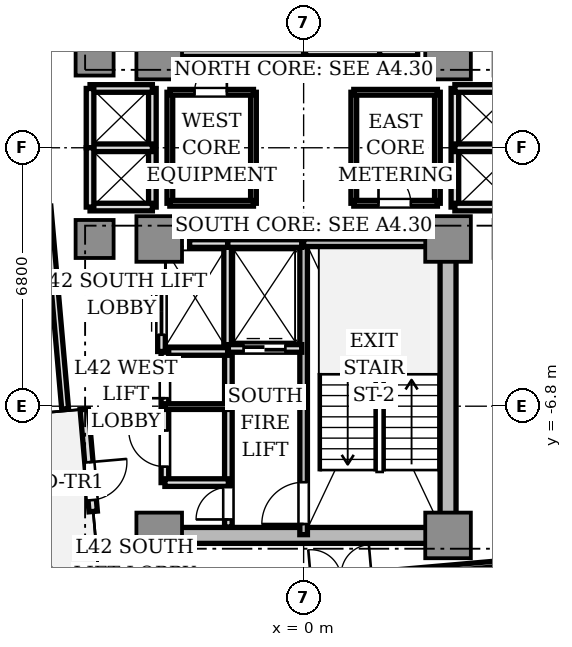
"""IFC4 building model, lengths in metres.
Left out: names, types, materials, properties, quantities, classifications, styles, units other than length and angle.
Written with IfcOpenShell. Run it as: python <this file> out.ifc"""

import sys

from ifc_helpers import new_model, si_unit, direction, frame, frame_2d, origin, origin_2d, place, context, subcontext, project, spatial, rectangle, extrude, source, transform, mapped, element, fill, save


model = new_model("IFC4")
c1 = context("Model", 3, precision=1e-05, world=origin(), true_north=direction((0.0, 1.0)))
c2 = subcontext(c1, "Body", "Model", "MODEL_VIEW")
j1 = project(units=[si_unit("LENGTHUNIT", "METRE"), si_unit("PLANEANGLEUNIT", "RADIAN")], contexts=[c1])
p1 = place(None, origin())
s1 = spatial("IfcSite", under=j1, at=p1, CompositionType="ELEMENT")
p2 = place(p1, origin())
s2 = spatial("IfcBuilding", under=s1, at=p2, CompositionType="ELEMENT")
p3 = place(p2, frame((0.0, 0.0, 153.95)))
s3 = spatial("IfcBuildingStorey", under=s2, at=p3, CompositionType="ELEMENT", Elevation=153.95)
p4 = place(p3, frame((-3.55, -10.2, 0.0), z_axis=(0.0, 0.0, 1.0), x_axis=(1.0, 0.0, 0.0)))
e1 = element("IfcWall", 1, at=p4, inside=s3, PredefinedType="SHEAR", context=c2, shape_type="SweptSolid", body=[
    extrude(rectangle(XDim=7.1, YDim=0.42, at=frame_2d((3.55, 0.0))), origin(), (0.0, 0.0, 1.0), 3.11),
])
p5 = place(p3, frame((3.8, -9.75, 0.0), z_axis=(0.0, 0.0, 1.0), x_axis=(0.0, 1.0, 0.0)))
e2 = element("IfcWall", 2, at=p5, inside=s3, PredefinedType="SHEAR", context=c2, shape_type="SweptSolid", body=[
    extrude(rectangle(XDim=6.9, YDim=0.42, at=frame_2d((3.45, 0.0))), origin(), (0.0, 0.0, 1.0), 3.11),
])
m1 = source(origin(), c2, "Body", "SweptSolid", [
    extrude(rectangle(XDim=1.2, YDim=1.2, at=origin_2d()), origin(), (0.0, 0.0, 1.0), 3.11),
])
for number, where, z_axis, x_axis in (
    (3, (-3.8, 2.4, 0.0), (0.0, 0.0, 1.0), (1.0, 0.0, 0.0)),
    (4, (3.8, 2.4, 0.0), (0.0, 0.0, 1.0), (1.0, 0.0, 0.0)),
    (5, (-3.8, -2.4, 0.0), (0.0, 0.0, 1.0), (1.0, 0.0, 0.0)),
    (6, (3.8, -2.4, 0.0), (0.0, 0.0, 1.0), (1.0, 0.0, 0.0)),
    (7, (-3.8, -10.2, 0.0), (0.0, 0.0, 1.0), (1.0, 0.0, 0.0)),
    (8, (3.8, -10.2, 0.0), (0.0, 0.0, 1.0), (1.0, 0.0, 0.0)),
):
    element("IfcColumn", number, at=place(p3, frame(where, z_axis=z_axis, x_axis=x_axis)), inside=s3, PredefinedType="COLUMN", context=c2, shape_type="MappedRepresentation", body=[
        mapped(m1, transform((0.0, 0.0, 0.0), scale=1.0)),
    ])
m2 = source(origin(), c2, "Body", "SweptSolid", [
    extrude(rectangle(XDim=1.0, YDim=1.0, at=origin_2d()), origin(), (0.0, 0.0, 1.0), 3.11),
])
for number, where, z_axis, x_axis in (
    (9, (-5.5, 2.4, 0.0), (0.0, 0.0, 1.0), (1.0, 0.0, 0.0)),
    (10, (-5.5, -2.4, 0.0), (0.0, 0.0, 1.0), (1.0, 0.0, 0.0)),
):
    element("IfcColumn", number, at=place(p3, frame(where, z_axis=z_axis, x_axis=x_axis)), inside=s3, PredefinedType="COLUMN", context=c2, shape_type="MappedRepresentation", body=[
        mapped(m2, transform((0.0, 0.0, 0.0), scale=1.0)),
    ])
p6 = place(p3, frame((-5.772, -6.879, 0.0), z_axis=(0.0, 0.0, 1.0), x_axis=(0.087168071984, -0.996193619346, 0.0)))
e11 = element("IfcWall", 11, at=p6, inside=s3, PredefinedType="STANDARD", context=c2, shape_type="SweptSolid", body=[
    extrude(rectangle(XDim=2.7, YDim=0.22, at=frame_2d((1.35, 0.0))), origin(), (0.0, 0.0, 1.0), 3.11),
])
p7 = place(p6, frame((1.4, 0.0, 0.0)))
e12 = element("IfcOpeningElement", 12, at=p7, cuts=e11, PredefinedType="OPENING", context=c2, shape_type="SweptSolid", body=[
    extrude(rectangle(XDim=1.0, YDim=2.2, at=frame_2d((0.5, 1.1))), frame((0.0, 0.12, 0.0), z_axis=(0.0, -1.0, 0.0), x_axis=(1.0, 0.0, 0.0)), (0.0, 0.0, 1.0), 0.24),
])
p8 = place(p3, frame((0.0, 2.5, 0.0), z_axis=(0.0, 0.0, 1.0), x_axis=(0.0, 1.0, 0.0)))
e13 = element("IfcWall", 13, at=p8, inside=s3, PredefinedType="SOLIDWALL", context=c2, shape_type="SweptSolid", body=[
    extrude(rectangle(XDim=7.68, YDim=0.2, at=frame_2d((3.84, 0.0))), origin(), (0.0, 0.0, 1.0), 3.11),
])
p9 = place(p8, frame((6.36, 0.0, 0.0)))
e14 = element("IfcOpeningElement", 14, at=p9, cuts=e13, PredefinedType="OPENING", context=c2, shape_type="SweptSolid", body=[
    extrude(rectangle(XDim=1.1, YDim=2.15, at=frame_2d((0.55, 1.075))), frame((0.0, 0.11, 0.0), z_axis=(0.0, -1.0, 0.0), x_axis=(1.0, 0.0, 0.0)), (0.0, 0.0, 1.0), 0.22),
])
p10 = place(p3, frame((-3.72, 2.5, 0.0), z_axis=(0.0, 0.0, 1.0), x_axis=(1.0, 0.0, 0.0)))
e15 = element("IfcWall", 15, at=p10, inside=s3, PredefinedType="SOLIDWALL", context=c2, shape_type="SweptSolid", body=[
    extrude(rectangle(XDim=3.72, YDim=0.2, at=frame_2d((1.86, 0.0))), origin(), (0.0, 0.0, 1.0), 3.11),
])
p11 = place(p3, frame((0.0, -10.18, 0.0), z_axis=(0.0, 0.0, 1.0), x_axis=(0.0, 1.0, 0.0)))
e16 = element("IfcWall", 16, at=p11, inside=s3, PredefinedType="SOLIDWALL", context=c2, shape_type="SweptSolid", body=[
    extrude(rectangle(XDim=7.68, YDim=0.2, at=frame_2d((3.84, 0.0))), origin(), (0.0, 0.0, 1.0), 3.11),
])
p12 = place(p11, frame((0.28, 0.0, 0.0)))
e17 = element("IfcOpeningElement", 17, at=p12, cuts=e16, PredefinedType="OPENING", context=c2, shape_type="SweptSolid", body=[
    extrude(rectangle(XDim=1.1, YDim=2.15, at=frame_2d((0.55, 1.075))), frame((0.0, 0.11, 0.0), z_axis=(0.0, -1.0, 0.0), x_axis=(1.0, 0.0, 0.0)), (0.0, 0.0, 1.0), 0.22),
])
p13 = place(p3, frame((0.0, -2.5, 0.0), z_axis=(0.0, 0.0, 1.0), x_axis=(1.0, 0.0, 0.0)))
e18 = element("IfcWall", 18, at=p13, inside=s3, PredefinedType="SOLIDWALL", context=c2, shape_type="SweptSolid", body=[
    extrude(rectangle(XDim=3.72, YDim=0.2, at=frame_2d((1.86, 0.0))), origin(), (0.0, 0.0, 1.0), 3.11),
])
p14 = place(p3, frame((-1.98, -9.98, 0.0), z_axis=(0.0, 0.0, 1.0), x_axis=(0.0, 1.0, 0.0)))
e19 = element("IfcWall", 19, at=p14, inside=s3, PredefinedType="SOLIDWALL", context=c2, shape_type="SweptSolid", body=[
    extrude(rectangle(XDim=4.66, YDim=0.2, at=frame_2d((2.33, 0.0))), origin(), (0.0, 0.0, 1.0), 2.66),
])
p15 = place(p14, frame((0.2, 0.0, 0.0)))
e20 = element("IfcOpeningElement", 20, at=p15, cuts=e19, PredefinedType="OPENING", context=c2, shape_type="SweptSolid", body=[
    extrude(rectangle(XDim=0.85, YDim=2.1, at=frame_2d((0.425, 1.05))), frame((0.0, 0.11, 0.0), z_axis=(0.0, -1.0, 0.0), x_axis=(1.0, 0.0, 0.0)), (0.0, 0.0, 1.0), 0.22),
])
p16 = place(p3, frame((2.0, 2.5, 0.0), z_axis=(0.0, 0.0, 1.0), x_axis=(0.0, 1.0, 0.0)))
e21 = element("IfcWall", 21, at=p16, inside=s3, PredefinedType="SOLIDWALL", context=c2, shape_type="SweptSolid", body=[
    extrude(rectangle(XDim=2.78, YDim=0.2, at=frame_2d((1.39, 0.0))), origin(), (0.0, 0.0, 1.0), 2.66),
])
p17 = place(p3, frame((0.05, 2.52, 0.0), z_axis=(0.0, 0.0, 1.0), x_axis=(1.0, 0.0, 0.0)))
e22 = element("IfcWall", 22, at=p17, inside=s3, PredefinedType="SOLIDWALL", context=c2, shape_type="SweptSolid", body=[
    extrude(rectangle(XDim=1.95, YDim=0.2, at=frame_2d((0.975, 0.0))), origin(), (0.0, 0.0, 1.0), 2.66),
])
p18 = place(p3, frame((-2.0, -5.28, 0.0), z_axis=(0.0, 0.0, 1.0), x_axis=(0.0, 1.0, 0.0)))
e23 = element("IfcWall", 23, at=p18, inside=s3, PredefinedType="SOLIDWALL", context=c2, shape_type="SweptSolid", body=[
    extrude(rectangle(XDim=2.78, YDim=0.2, at=frame_2d((1.39, 0.0))), origin(), (0.0, 0.0, 1.0), 2.66),
])
p19 = place(p3, frame((-2.0, -2.52, 0.0), z_axis=(0.0, 0.0, 1.0), x_axis=(1.0, 0.0, 0.0)))
e24 = element("IfcWall", 24, at=p19, inside=s3, PredefinedType="SOLIDWALL", context=c2, shape_type="SweptSolid", body=[
    extrude(rectangle(XDim=1.95, YDim=0.2, at=frame_2d((0.975, 0.0))), origin(), (0.0, 0.0, 1.0), 2.66),
])
p20 = place(p3, frame((-1.98, -5.28, 0.0), z_axis=(0.0, 0.0, 1.0), x_axis=(1.0, 0.0, 0.0)))
e25 = element("IfcWall", 25, at=p20, inside=s3, PredefinedType="SOLIDWALL", context=c2, shape_type="SweptSolid", body=[
    extrude(rectangle(XDim=1.93, YDim=0.2, at=frame_2d((0.965, 0.0))), origin(), (0.0, 0.0, 1.0), 2.66),
])
p21 = place(p20, frame((0.4, 0.0, 0.0)))
e26 = element("IfcOpeningElement", 26, at=p21, cuts=e25, PredefinedType="OPENING", context=c2, shape_type="SweptSolid", body=[
    extrude(rectangle(XDim=1.1, YDim=2.2, at=frame_2d((0.55, 1.1))), frame((0.0, 0.11, 0.0), z_axis=(0.0, -1.0, 0.0), x_axis=(1.0, 0.0, 0.0)), (0.0, 0.0, 1.0), 0.22),
])
for number, where, z_axis, x_axis in (
    (27, (2.0, 2.52, 0.0), (0.0, 0.0, 1.0), (1.0, 0.0, 0.0)),
    (28, (-3.0, -2.52, 0.0), (0.0, 0.0, 1.0), (1.0, 0.0, 0.0)),
):
    element("IfcWall", number, at=place(p3, frame(where, z_axis=z_axis, x_axis=x_axis)), inside=s3, PredefinedType="SOLIDWALL", context=c2, shape_type="SweptSolid", body=[
        extrude(rectangle(XDim=1.0, YDim=0.2, at=frame_2d((0.5, 0.0))), origin(), (0.0, 0.0, 1.0), 2.66),
    ])
p22 = place(p3, frame((-3.74, -5.36, 0.0), z_axis=(0.0, 0.0, 1.0), x_axis=(1.0, 0.0, 0.0)))
e29 = element("IfcWall", 29, at=p22, inside=s3, PredefinedType="SOLIDWALL", context=c2, shape_type="SweptSolid", body=[
    extrude(rectangle(XDim=1.74, YDim=0.2, at=frame_2d((0.87, 0.0))), origin(), (0.0, 0.0, 1.0), 2.66),
])
p23 = place(p3, frame((-3.74, -5.36, 0.0), z_axis=(0.0, 0.0, 1.0), x_axis=(0.0, 1.0, 0.0)))
e30 = element("IfcWall", 30, at=p23, inside=s3, PredefinedType="SOLIDWALL", context=c2, shape_type="SweptSolid", body=[
    extrude(rectangle(XDim=2.08, YDim=0.2, at=frame_2d((1.04, 0.0))), origin(), (0.0, 0.0, 1.0), 2.66),
])
p24 = place(p23, frame((0.44, 0.0, 0.0)))
e31 = element("IfcOpeningElement", 31, at=p24, cuts=e30, PredefinedType="OPENING", context=c2, shape_type="SweptSolid", body=[
    extrude(rectangle(XDim=1.2, YDim=2.2, at=frame_2d((0.6, 1.1))), frame((0.0, 0.11, 0.0), z_axis=(0.0, -1.0, 0.0), x_axis=(1.0, 0.0, 0.0)), (0.0, 0.0, 1.0), 0.22),
])
p25 = place(p3, frame((3.98, -1.56, 0.0), z_axis=(0.0, 0.0, 1.0), x_axis=(0.0, 1.0, 0.0)))
e32 = element("IfcWall", 32, at=p25, inside=s3, PredefinedType="SOLIDWALL", context=c2, shape_type="SweptSolid", body=[
    extrude(rectangle(XDim=3.12, YDim=0.2, at=frame_2d((1.56, 0.0))), origin(), (0.0, 0.0, 1.0), 2.28),
])
for number, where, z_axis, x_axis in (
    (33, (3.98, 1.56, 0.0), (0.0, 0.0, 1.0), (1.0, 0.0, 0.0)),
    (34, (3.98, -1.56, 0.0), (0.0, 0.0, 1.0), (1.0, 0.0, 0.0)),
    (35, (3.98, 0.0, 0.0), (0.0, 0.0, 1.0), (1.0, 0.0, 0.0)),
):
    element("IfcWall", number, at=place(p3, frame(where, z_axis=z_axis, x_axis=x_axis)), inside=s3, PredefinedType="SOLIDWALL", context=c2, shape_type="SweptSolid", body=[
        extrude(rectangle(XDim=1.64, YDim=0.2, at=frame_2d((0.82, 0.0))), origin(), (0.0, 0.0, 1.0), 2.66),
    ])
p26 = place(p3, frame((-3.98, -1.56, 0.0), z_axis=(0.0, 0.0, 1.0), x_axis=(0.0, 1.0, 0.0)))
e36 = element("IfcWall", 36, at=p26, inside=s3, PredefinedType="SOLIDWALL", context=c2, shape_type="SweptSolid", body=[
    extrude(rectangle(XDim=3.12, YDim=0.2, at=frame_2d((1.56, 0.0))), origin(), (0.0, 0.0, 1.0), 2.28),
])
for number, where, z_axis, x_axis in (
    (37, (-5.62, 1.56, 0.0), (0.0, 0.0, 1.0), (1.0, 0.0, 0.0)),
    (38, (-5.62, -1.56, 0.0), (0.0, 0.0, 1.0), (1.0, 0.0, 0.0)),
    (39, (-5.62, 0.0, 0.0), (0.0, 0.0, 1.0), (1.0, 0.0, 0.0)),
):
    element("IfcWall", number, at=place(p3, frame(where, z_axis=z_axis, x_axis=x_axis)), inside=s3, PredefinedType="SOLIDWALL", context=c2, shape_type="SweptSolid", body=[
        extrude(rectangle(XDim=1.64, YDim=0.2, at=frame_2d((0.82, 0.0))), origin(), (0.0, 0.0, 1.0), 2.66),
    ])
for number, where, z_axis, x_axis in (
    (40, (-5.62, 0.0, 0.0), (0.0, 0.0, 1.0), (0.0, 1.0, 0.0)),
    (41, (-5.62, -1.56, 0.0), (0.0, 0.0, 1.0), (0.0, 1.0, 0.0)),
):
    element("IfcWall", number, at=place(p3, frame(where, z_axis=z_axis, x_axis=x_axis)), inside=s3, PredefinedType="SOLIDWALL", context=c2, shape_type="SweptSolid", body=[
        extrude(rectangle(XDim=1.56, YDim=0.2, at=frame_2d((0.78, 0.0))), origin(), (0.0, 0.0, 1.0), 2.66),
    ])
p27 = place(p3, frame((-3.65, -8.81, 0.0), z_axis=(0.0, 0.0, 1.0), x_axis=(0.0, 1.0, 0.0)))
e42 = element("IfcWall", 42, at=p27, inside=s3, PredefinedType="SOLIDWALL", context=c2, shape_type="SweptSolid", body=[
    extrude(rectangle(XDim=3.43, YDim=0.2, at=frame_2d((1.715, 0.0))), origin(), (0.0, 0.0, 1.0), 2.66),
])
p28 = place(p27, frame((0.42, 0.0, 0.0)))
e43 = element("IfcOpeningElement", 43, at=p28, cuts=e42, PredefinedType="OPENING", context=c2, shape_type="SweptSolid", body=[
    extrude(rectangle(XDim=0.95, YDim=2.15, at=frame_2d((0.475, 1.075))), frame((0.0, 0.11, 0.0), z_axis=(0.0, -1.0, 0.0), x_axis=(1.0, 0.0, 0.0)), (0.0, 0.0, 1.0), 0.22),
])
p29 = place(p27, frame((2.22, 0.0, 0.0)))
e44 = element("IfcOpeningElement", 44, at=p29, cuts=e42, PredefinedType="OPENING", context=c2, shape_type="SweptSolid", body=[
    extrude(rectangle(XDim=0.85, YDim=2.1, at=frame_2d((0.425, 1.05))), frame((0.0, 0.11, 0.0), z_axis=(0.0, -1.0, 0.0), x_axis=(1.0, 0.0, 0.0)), (0.0, 0.0, 1.0), 0.22),
])
p30 = place(p3, frame((-3.65, -8.81, 0.0), z_axis=(0.0, 0.0, 1.0), x_axis=(1.0, 0.0, 0.0)))
e45 = element("IfcWall", 45, at=p30, inside=s3, PredefinedType="SOLIDWALL", context=c2, shape_type="SweptSolid", body=[
    extrude(rectangle(XDim=1.67, YDim=0.2, at=frame_2d((0.835, 0.0))), origin(), (0.0, 0.0, 1.0), 2.66),
])
p31 = place(p3, frame((-3.65, -6.81, 0.0), z_axis=(0.0, 0.0, 1.0), x_axis=(1.0, 0.0, 0.0)))
e46 = element("IfcWall", 46, at=p31, inside=s3, PredefinedType="PARTITIONING", context=c2, shape_type="SweptSolid", body=[
    extrude(rectangle(XDim=1.67, YDim=0.15, at=frame_2d((0.835, 0.0))), origin(), (0.0, 0.0, 1.0), 2.66),
])
p32 = place(p3, frame((-1.32, -1.46, 0.0), z_axis=(0.0, 0.0, 1.0), x_axis=(0.0, 1.0, 0.0)))
e47 = element("IfcWall", 47, at=p32, inside=s3, PredefinedType="PARTITIONING", context=c2, shape_type="SweptSolid", body=[
    extrude(rectangle(XDim=2.92, YDim=0.15, at=frame_2d((1.46, 0.0))), origin(), (0.0, 0.0, 1.0), 2.66),
])
p33 = place(p3, frame((-3.52, -1.46, 0.0), z_axis=(0.0, 0.0, 1.0), x_axis=(0.0, 1.0, 0.0)))
e48 = element("IfcWall", 48, at=p33, inside=s3, PredefinedType="PARTITIONING", context=c2, shape_type="SweptSolid", body=[
    extrude(rectangle(XDim=2.92, YDim=0.15, at=frame_2d((1.46, 0.0))), origin(), (0.0, 0.0, 1.0), 2.28),
])
p34 = place(p3, frame((-3.52, 1.46, 0.0), z_axis=(0.0, 0.0, 1.0), x_axis=(1.0, 0.0, 0.0)))
e49 = element("IfcWall", 49, at=p34, inside=s3, PredefinedType="PARTITIONING", context=c2, shape_type="SweptSolid", body=[
    extrude(rectangle(XDim=2.2, YDim=0.15, at=frame_2d((1.1, 0.0))), origin(), (0.0, 0.0, 1.0), 2.66),
])
p35 = place(p34, frame((0.65, 0.0, 0.0)))
e50 = element("IfcOpeningElement", 50, at=p35, cuts=e49, PredefinedType="OPENING", context=c2, shape_type="SweptSolid", body=[
    extrude(rectangle(XDim=0.85, YDim=2.1, at=frame_2d((0.425, 1.05))), frame((0.0, 0.085, 0.0), z_axis=(0.0, -1.0, 0.0), x_axis=(1.0, 0.0, 0.0)), (0.0, 0.0, 1.0), 0.17),
])
p36 = place(p3, frame((-3.52, -1.46, 0.0), z_axis=(0.0, 0.0, 1.0), x_axis=(1.0, 0.0, 0.0)))
e51 = element("IfcWall", 51, at=p36, inside=s3, PredefinedType="PARTITIONING", context=c2, shape_type="SweptSolid", body=[
    extrude(rectangle(XDim=2.2, YDim=0.15, at=frame_2d((1.1, 0.0))), origin(), (0.0, 0.0, 1.0), 2.66),
])
p37 = place(p3, frame((1.32, -1.46, 0.0), z_axis=(0.0, 0.0, 1.0), x_axis=(0.0, 1.0, 0.0)))
e52 = element("IfcWall", 52, at=p37, inside=s3, PredefinedType="PARTITIONING", context=c2, shape_type="SweptSolid", body=[
    extrude(rectangle(XDim=2.92, YDim=0.15, at=frame_2d((1.46, 0.0))), origin(), (0.0, 0.0, 1.0), 2.66),
])
p38 = place(p3, frame((3.52, -1.46, 0.0), z_axis=(0.0, 0.0, 1.0), x_axis=(0.0, 1.0, 0.0)))
e53 = element("IfcWall", 53, at=p38, inside=s3, PredefinedType="PARTITIONING", context=c2, shape_type="SweptSolid", body=[
    extrude(rectangle(XDim=2.92, YDim=0.15, at=frame_2d((1.46, 0.0))), origin(), (0.0, 0.0, 1.0), 2.28),
])
p39 = place(p3, frame((1.32, 1.46, 0.0), z_axis=(0.0, 0.0, 1.0), x_axis=(1.0, 0.0, 0.0)))
e54 = element("IfcWall", 54, at=p39, inside=s3, PredefinedType="PARTITIONING", context=c2, shape_type="SweptSolid", body=[
    extrude(rectangle(XDim=2.2, YDim=0.15, at=frame_2d((1.1, 0.0))), origin(), (0.0, 0.0, 1.0), 2.66),
])
p40 = place(p3, frame((1.32, -1.46, 0.0), z_axis=(0.0, 0.0, 1.0), x_axis=(1.0, 0.0, 0.0)))
e55 = element("IfcWall", 55, at=p40, inside=s3, PredefinedType="PARTITIONING", context=c2, shape_type="SweptSolid", body=[
    extrude(rectangle(XDim=2.2, YDim=0.15, at=frame_2d((1.1, 0.0))), origin(), (0.0, 0.0, 1.0), 2.66),
])
p41 = place(p40, frame((0.65, 0.0, 0.0)))
e56 = element("IfcOpeningElement", 56, at=p41, cuts=e55, PredefinedType="OPENING", context=c2, shape_type="SweptSolid", body=[
    extrude(rectangle(XDim=0.85, YDim=2.1, at=frame_2d((0.425, 1.05))), frame((0.0, 0.085, 0.0), z_axis=(0.0, -1.0, 0.0), x_axis=(1.0, 0.0, 0.0)), (0.0, 0.0, 1.0), 0.17),
])
p42 = place(p3, frame((-6.741, -1.543, 0.0), z_axis=(0.0, 0.0, 1.0), x_axis=(0.087161289348, -0.996194212812, 0.0)))
e57 = element("IfcWall", 57, at=p42, inside=s3, PredefinedType="PARTITIONING", context=c2, shape_type="SweptSolid", body=[
    extrude(rectangle(XDim=5.35, YDim=0.18, at=frame_2d((2.675, 0.0))), origin(), (0.0, 0.0, 1.0), 2.66),
])
p43 = place(p3, frame((-5.287, -11.856, 0.0), z_axis=(0.0, 0.0, 1.0), x_axis=(0.996194790044, 0.087154691724, 0.0)))
e58 = element("IfcWall", 58, at=p43, inside=s3, PredefinedType="PARTITIONING", context=c2, shape_type="SweptSolid", body=[
    extrude(rectangle(XDim=12.6, YDim=0.15, at=frame_2d((6.3, 0.0))), origin(), (0.0, 0.0, 1.0), 2.66),
])
p44 = place(p43, frame((5.5, 0.0, 0.0)))
e59 = element("IfcOpeningElement", 59, at=p44, cuts=e58, PredefinedType="OPENING", context=c2, shape_type="SweptSolid", body=[
    extrude(rectangle(XDim=1.6, YDim=2.25, at=frame_2d((0.8, 1.125))), frame((0.0, 0.085, 0.0), z_axis=(0.0, -1.0, 0.0), x_axis=(1.0, 0.0, 0.0)), (0.0, 0.0, 1.0), 0.17),
])
m3 = source(origin(), c2, "Body", "SweptSolid", [
    extrude(rectangle(XDim=1.0, YDim=0.05, at=origin_2d()), origin(), (0.0, 0.0, 1.0), 2.2),
])
p45 = place(p7, frame((0.5, 0.0, 0.0)))
e60 = element("IfcDoor", 60, at=p45, inside=s3, OperationType="SINGLE_SWING_LEFT", PredefinedType="DOOR", context=c2, shape_type="MappedRepresentation", body=[
    mapped(m3, transform((0.0, 0.0, 0.0), scale=1.0)),
])
fill(e12, e60)
m4 = source(origin(), c2, "Body", "SweptSolid", [
    extrude(rectangle(XDim=1.1, YDim=0.05, at=origin_2d()), origin(), (0.0, 0.0, 1.0), 2.15),
])
p46 = place(p12, frame((0.55, 0.0, 0.0)))
e61 = element("IfcDoor", 61, at=p46, inside=s3, OperationType="SINGLE_SWING_LEFT", PredefinedType="DOOR", context=c2, shape_type="MappedRepresentation", body=[
    mapped(m4, transform((0.0, 0.0, 0.0), scale=1.0)),
])
fill(e17, e61)
m5 = source(origin(), c2, "Body", "SweptSolid", [
    extrude(rectangle(XDim=0.85, YDim=0.05, at=origin_2d()), origin(), (0.0, 0.0, 1.0), 2.1),
])
p47 = place(p15, frame((0.425, 0.0, 0.0)))
e62 = element("IfcDoor", 62, at=p47, inside=s3, OperationType="SINGLE_SWING_LEFT", PredefinedType="DOOR", context=c2, shape_type="MappedRepresentation", body=[
    mapped(m5, transform((0.0, 0.0, 0.0), scale=1.0)),
])
fill(e20, e62)
m6 = source(origin(), c2, "Body", "SweptSolid", [
    extrude(rectangle(XDim=1.1, YDim=0.05, at=origin_2d()), origin(), (0.0, 0.0, 1.0), 2.2),
])
p48 = place(p21, frame((0.55, 0.0, 0.0)))
e63 = element("IfcDoor", 63, at=p48, inside=s3, OperationType="DOUBLE_DOOR_SLIDING", PredefinedType="DOOR", context=c2, shape_type="MappedRepresentation", body=[
    mapped(m6, transform((0.0, 0.0, 0.0), scale=1.0)),
])
fill(e26, e63)
m7 = source(origin(), c2, "Body", "SweptSolid", [
    extrude(rectangle(XDim=1.2, YDim=0.05, at=origin_2d()), origin(), (0.0, 0.0, 1.0), 2.2),
])
p49 = place(p24, frame((0.6, 0.0, 0.0)))
e64 = element("IfcDoor", 64, at=p49, inside=s3, OperationType="DOUBLE_DOOR_SLIDING", PredefinedType="DOOR", context=c2, shape_type="MappedRepresentation", body=[
    mapped(m7, transform((0.0, 0.0, 0.0), scale=1.0)),
])
fill(e31, e64)
m8 = source(origin(), c2, "Body", "SweptSolid", [
    extrude(rectangle(XDim=0.95, YDim=0.05, at=origin_2d()), origin(), (0.0, 0.0, 1.0), 2.15),
])
p50 = place(p28, frame((0.475, 0.0, 0.0)))
e65 = element("IfcDoor", 65, at=p50, inside=s3, OperationType="SINGLE_SWING_RIGHT", PredefinedType="DOOR", context=c2, shape_type="MappedRepresentation", body=[
    mapped(m8, transform((0.0, 0.0, 0.0), scale=1.0)),
])
fill(e43, e65)
p51 = place(p29, frame((0.425, 0.0, 0.0)))
e66 = element("IfcDoor", 66, at=p51, inside=s3, OperationType="SINGLE_SWING_LEFT", PredefinedType="DOOR", context=c2, shape_type="MappedRepresentation", body=[
    mapped(m5, transform((0.0, 0.0, 0.0), scale=1.0)),
])
fill(e44, e66)
p52 = place(p35, frame((0.425, 0.0, 0.0)))
e67 = element("IfcDoor", 67, at=p52, inside=s3, OperationType="SINGLE_SWING_RIGHT", PredefinedType="DOOR", context=c2, shape_type="MappedRepresentation", body=[
    mapped(m5, transform((0.0, 0.0, 0.0), scale=1.0)),
])
fill(e50, e67)
p53 = place(p41, frame((0.425, 0.0, 0.0)))
e68 = element("IfcDoor", 68, at=p53, inside=s3, OperationType="SINGLE_SWING_LEFT", PredefinedType="DOOR", context=c2, shape_type="MappedRepresentation", body=[
    mapped(m5, transform((0.0, 0.0, 0.0), scale=1.0)),
])
fill(e56, e68)
save(model, sys.argv[1])
